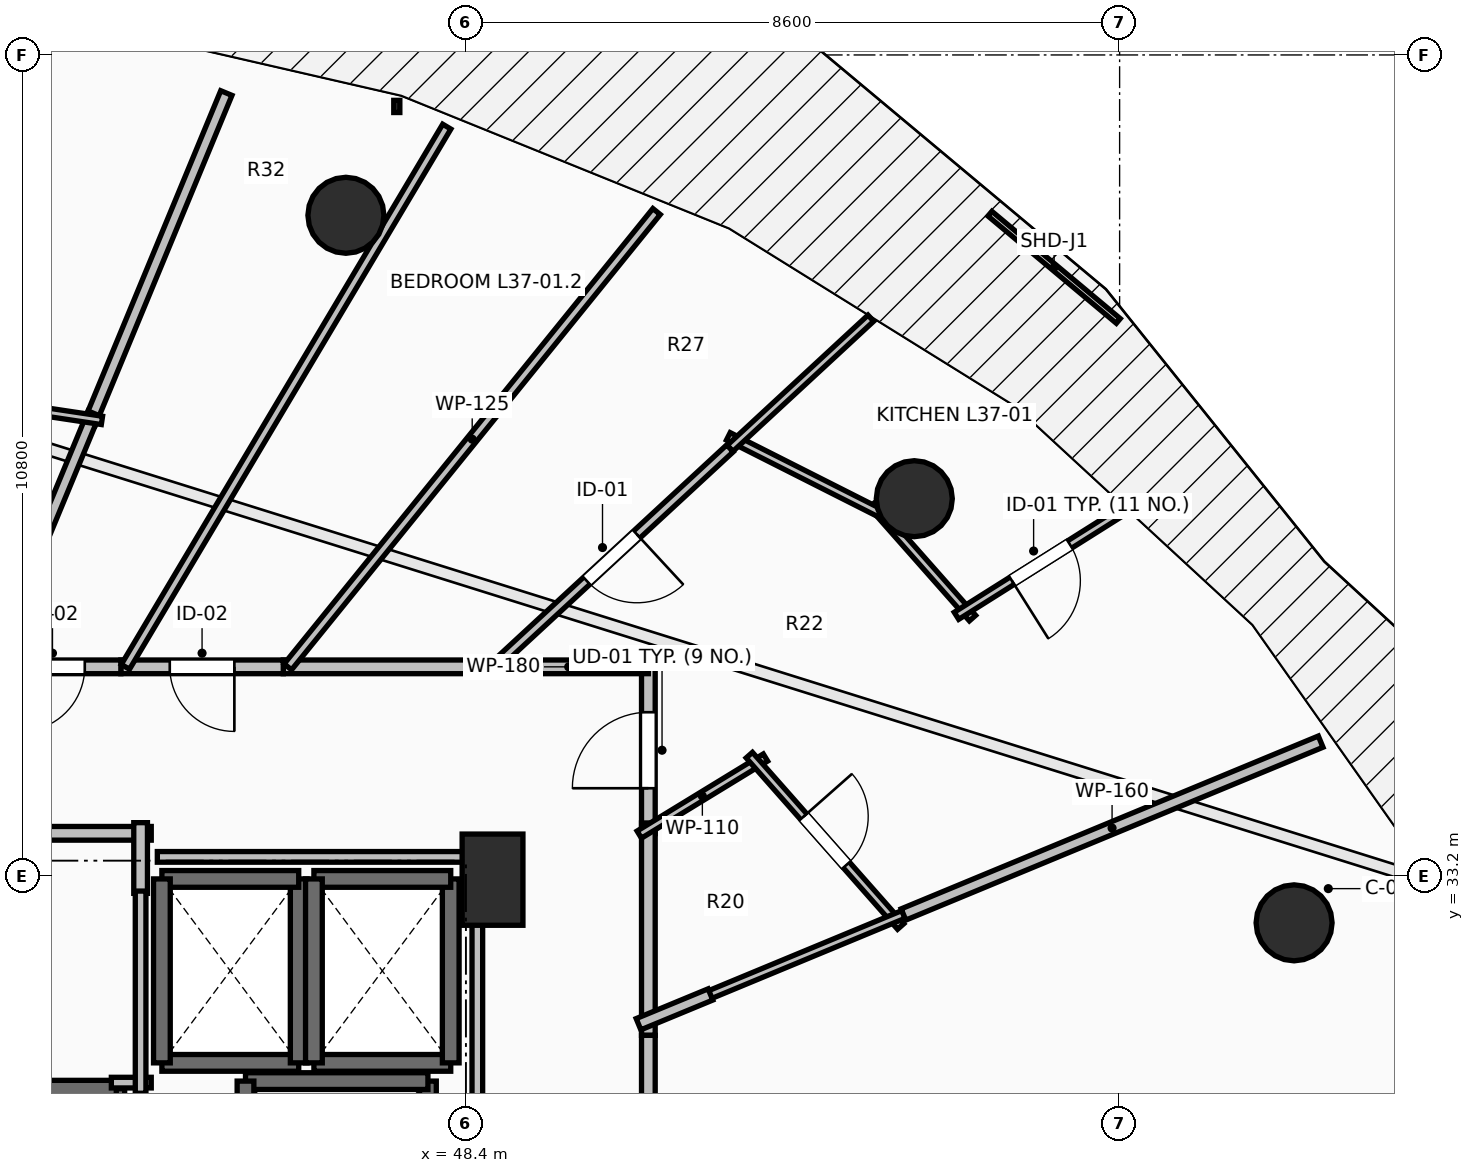
"""IFC4 building model, lengths in metres.
Left out: names, types, materials, properties, quantities, classifications, styles, units other than length and angle.
Written with IfcOpenShell. Run it as: python <this file> out.ifc"""

import sys

from ifc_helpers import new_model, si_unit, direction, frame, frame_2d, origin, origin_2d, place, context, subcontext, project, spatial, rectangle, circle, extrude, element, fill, save


model = new_model("IFC4")
c1 = context("Model", 3, precision=1e-05, world=origin(), true_north=direction((0.0, 1.0)))
c2 = subcontext(c1, "Body", "Model", "MODEL_VIEW")
j1 = project(units=[si_unit("LENGTHUNIT", "METRE"), si_unit("PLANEANGLEUNIT", "RADIAN")], contexts=[c1])
p1 = place(None, origin())
s1 = spatial("IfcSite", under=j1, at=p1, CompositionType="ELEMENT")
p2 = place(p1, origin())
s2 = spatial("IfcBuilding", under=s1, at=p2, CompositionType="ELEMENT")
p3 = place(p2, frame((0.0, 0.0, 139.6)))
s3 = spatial("IfcBuildingStorey", under=s2, at=p3, CompositionType="ELEMENT", Elevation=139.6)
for number, where, z_axis, x_axis in (
    (1, (59.295, 32.582, 0.0), (0.0, 0.0, 1.0), (0.924, 0.383, 0.0)),
    (2, (54.299, 38.162, 0.0), (0.0, 0.0, 1.0), (0.707, 0.707, 0.0)),
    (3, (46.821, 41.891, 0.0), (0.0, 0.0, 1.0), (0.383, 0.924, 0.0)),
):
    element("IfcColumn", number, at=place(p3, frame(where, z_axis=z_axis, x_axis=x_axis)), inside=s3, PredefinedType="COLUMN", context=c2, shape_type="SweptSolid", body=[
        extrude(circle(Radius=0.5, at=origin_2d()), origin(), (0.0, 0.0, 1.0), 3.5),
    ])
p4 = place(p3, frame((48.75, 33.15, 0.0), z_axis=(0.0, 0.0, 1.0), x_axis=(1.0, 0.0, 0.0)))
e4 = element("IfcColumn", 4, at=p4, inside=s3, PredefinedType="PILASTER", context=c2, shape_type="SweptSolid", body=[
    extrude(rectangle(XDim=0.8, YDim=1.2, at=origin_2d()), origin(), (0.0, 0.0, 1.0), 3.5),
])
p5 = place(p3, frame((43.8, 27.8, 0.0), z_axis=(0.0, 0.0, 1.0), x_axis=(0.0, 1.0, 0.0)))
e5 = element("IfcWall", 5, at=p5, inside=s3, PredefinedType="SOLIDWALL", context=c2, shape_type="SweptSolid", body=[
    extrude(rectangle(XDim=2.6, YDim=0.22, at=frame_2d((1.3, 0.0))), origin(), (0.0, 0.0, 1.0), 3.24),
])
p6 = place(p3, frame((43.8, 30.4, 0.0), z_axis=(0.0, 0.0, 1.0), x_axis=(-1.0, 0.0, 0.0)))
e6 = element("IfcWall", 6, at=p6, inside=s3, PredefinedType="SOLIDWALL", context=c2, shape_type="SweptSolid", body=[
    extrude(rectangle(XDim=2.2, YDim=0.22, at=frame_2d((1.1, 0.0))), origin(), (0.0, 0.0, 1.0), 3.24),
])
p7 = place(p3, frame((44.4, 30.74, 0.0), z_axis=(0.0, 0.0, 1.0), x_axis=(1.0, 0.0, 0.0)))
e7 = element("IfcWall", 7, at=p7, inside=s3, PredefinedType="SOLIDWALL", context=c2, shape_type="SweptSolid", body=[
    extrude(rectangle(XDim=1.8, YDim=0.22, at=frame_2d((0.9, 0.0))), origin(), (0.0, 0.0, 1.0), 3.24),
])
p8 = place(p3, frame((46.2, 30.74, 0.0), z_axis=(0.0, 0.0, 1.0), x_axis=(0.0, 1.0, 0.0)))
e8 = element("IfcWall", 8, at=p8, inside=s3, PredefinedType="SOLIDWALL", context=c2, shape_type="SweptSolid", body=[
    extrude(rectangle(XDim=2.42, YDim=0.22, at=frame_2d((1.21, 0.0))), origin(), (0.0, 0.0, 1.0), 3.24),
])
p9 = place(p3, frame((46.2, 33.16, 0.0), z_axis=(0.0, 0.0, 1.0), x_axis=(-1.0, 0.0, 0.0)))
e9 = element("IfcWall", 9, at=p9, inside=s3, PredefinedType="SOLIDWALL", context=c2, shape_type="SweptSolid", body=[
    extrude(rectangle(XDim=1.8, YDim=0.22, at=frame_2d((0.9, 0.0))), origin(), (0.0, 0.0, 1.0), 3.24),
])
p10 = place(p3, frame((44.4, 33.16, 0.0), z_axis=(0.0, 0.0, 1.0), x_axis=(0.0, -1.0, 0.0)))
e10 = element("IfcWall", 10, at=p10, inside=s3, PredefinedType="SOLIDWALL", context=c2, shape_type="SweptSolid", body=[
    extrude(rectangle(XDim=2.42, YDim=0.22, at=frame_2d((1.21, 0.0))), origin(), (0.0, 0.0, 1.0), 3.24),
])
p11 = place(p3, frame((46.4, 30.74, 0.0), z_axis=(0.0, 0.0, 1.0), x_axis=(1.0, 0.0, 0.0)))
e11 = element("IfcWall", 11, at=p11, inside=s3, PredefinedType="SOLIDWALL", context=c2, shape_type="SweptSolid", body=[
    extrude(rectangle(XDim=1.8, YDim=0.22, at=frame_2d((0.9, 0.0))), origin(), (0.0, 0.0, 1.0), 3.24),
])
p12 = place(p3, frame((48.2, 30.74, 0.0), z_axis=(0.0, 0.0, 1.0), x_axis=(0.0, 1.0, 0.0)))
e12 = element("IfcWall", 12, at=p12, inside=s3, PredefinedType="SOLIDWALL", context=c2, shape_type="SweptSolid", body=[
    extrude(rectangle(XDim=2.42, YDim=0.22, at=frame_2d((1.21, 0.0))), origin(), (0.0, 0.0, 1.0), 3.24),
])
p13 = place(p3, frame((48.2, 33.16, 0.0), z_axis=(0.0, 0.0, 1.0), x_axis=(-1.0, 0.0, 0.0)))
e13 = element("IfcWall", 13, at=p13, inside=s3, PredefinedType="SOLIDWALL", context=c2, shape_type="SweptSolid", body=[
    extrude(rectangle(XDim=1.8, YDim=0.22, at=frame_2d((0.9, 0.0))), origin(), (0.0, 0.0, 1.0), 3.24),
])
p14 = place(p3, frame((46.4, 33.16, 0.0), z_axis=(0.0, 0.0, 1.0), x_axis=(0.0, -1.0, 0.0)))
e14 = element("IfcWall", 14, at=p14, inside=s3, PredefinedType="SOLIDWALL", context=c2, shape_type="SweptSolid", body=[
    extrude(rectangle(XDim=2.42, YDim=0.22, at=frame_2d((1.21, 0.0))), origin(), (0.0, 0.0, 1.0), 3.24),
])
p15 = place(p3, frame((47.9, 28.0, 0.0), z_axis=(0.0, 0.0, 1.0), x_axis=(0.0, 1.0, 0.0)))
e15 = element("IfcWall", 15, at=p15, inside=s3, PredefinedType="SHEAR", context=c2, shape_type="SweptSolid", body=[
    extrude(rectangle(XDim=2.5, YDim=0.22, at=frame_2d((1.25, 0.0))), origin(), (0.0, 0.0, 1.0), 3.24),
])
p16 = place(p3, frame((47.9, 30.5, 0.0), z_axis=(0.0, 0.0, 1.0), x_axis=(-1.0, 0.0, 0.0)))
e16 = element("IfcWall", 16, at=p16, inside=s3, PredefinedType="SHEAR", context=c2, shape_type="SweptSolid", body=[
    extrude(rectangle(XDim=2.4, YDim=0.22, at=frame_2d((1.2, 0.0))), origin(), (0.0, 0.0, 1.0), 3.24),
])
p17 = place(p3, frame((45.5, 30.5, 0.0), z_axis=(0.0, 0.0, 1.0), x_axis=(0.0, -1.0, 0.0)))
e17 = element("IfcWall", 17, at=p17, inside=s3, PredefinedType="SHEAR", context=c2, shape_type="SweptSolid", body=[
    extrude(rectangle(XDim=2.5, YDim=0.22, at=frame_2d((1.25, 0.0))), origin(), (0.0, 0.0, 1.0), 3.24),
])
p18 = place(p3, frame((44.26, 33.76, 0.0), z_axis=(0.0, 0.0, 1.0), x_axis=(-1.0, 0.0, 0.0)))
e18 = element("IfcWall", 18, at=p18, inside=s3, PredefinedType="PARTITIONING", context=c2, shape_type="SweptSolid", body=[
    extrude(rectangle(XDim=4.61, YDim=0.18, at=frame_2d((2.305, 0.0))), origin(), (0.0, 0.0, 1.0), 3.24),
])
p19 = place(p18, frame((1.88, 0.0, 0.0)))
e19 = element("IfcOpeningElement", 19, at=p19, cuts=e18, PredefinedType="OPENING", context=c2, shape_type="SweptSolid", body=[
    extrude(rectangle(XDim=0.85, YDim=2.1, at=frame_2d((0.425, 1.05))), frame((0.0, 0.105, 0.0), z_axis=(0.0, -1.0, 0.0), x_axis=(1.0, 0.0, 0.0)), (0.0, 0.0, 1.0), 0.21),
])
p20 = place(p3, frame((44.12, 32.97, 0.0), z_axis=(0.0, 0.0, 1.0), x_axis=(0.0, 1.0, 0.0)))
e20 = element("IfcWall", 20, at=p20, inside=s3, PredefinedType="PARTITIONING", context=c2, shape_type="SweptSolid", body=[
    extrude(rectangle(XDim=0.93, YDim=0.18, at=frame_2d((0.465, 0.0))), origin(), (0.0, 0.0, 1.0), 3.24),
])
p21 = place(p3, frame((50.8, 33.756, 0.0), z_axis=(0.0, 0.0, 1.0), x_axis=(0.0, 1.0, 0.0)))
e21 = element("IfcWall", 21, at=p21, inside=s3, PredefinedType="PARTITIONING", context=c2, shape_type="SweptSolid", body=[
    extrude(rectangle(XDim=2.194, YDim=0.18, at=frame_2d((1.097, 0.0))), origin(), (0.0, 0.0, 1.0), 2.432),
])
p22 = place(p21, frame((0.597, 0.0, 0.0)))
e22 = element("IfcOpeningElement", 22, at=p22, cuts=e21, PredefinedType="OPENING", context=c2, shape_type="SweptSolid", body=[
    extrude(rectangle(XDim=1.0, YDim=2.15, at=frame_2d((0.5, 1.075))), frame((0.0, 0.105, 0.0), z_axis=(0.0, -1.0, 0.0), x_axis=(1.0, 0.0, 0.0)), (0.0, 0.0, 1.0), 0.21),
])
p23 = place(p3, frame((50.8, 35.95, 0.0), z_axis=(0.0, 0.0, 1.0), x_axis=(-1.0, 0.0, 0.0)))
e23 = element("IfcWall", 23, at=p23, inside=s3, PredefinedType="PARTITIONING", context=c2, shape_type="SweptSolid", body=[
    extrude(rectangle(XDim=2.096, YDim=0.18, at=frame_2d((1.048, 0.0))), origin(), (0.0, 0.0, 1.0), 2.972),
])
p24 = place(p3, frame((50.8, 31.102, 0.0), z_axis=(0.0, 0.0, 1.0), x_axis=(0.0, 1.0, 0.0)))
e24 = element("IfcWall", 24, at=p24, inside=s3, PredefinedType="PARTITIONING", context=c2, shape_type="SweptSolid", body=[
    extrude(rectangle(XDim=2.794, YDim=0.18, at=frame_2d((1.397, 0.0))), origin(), (0.0, 0.0, 1.0), 2.432),
])
p25 = place(p3, frame((48.704, 35.95, 0.0), z_axis=(0.0, 0.0, 1.0), x_axis=(-1.0, 0.0, 0.0)))
e25 = element("IfcWall", 25, at=p25, inside=s3, PredefinedType="PARTITIONING", context=c2, shape_type="SweptSolid", body=[
    extrude(rectangle(XDim=2.707, YDim=0.18, at=frame_2d((1.354, 0.0))), origin(), (0.0, 0.0, 1.0), 2.432),
])
p26 = place(p3, frame((45.997, 35.95, 0.0), z_axis=(0.0, 0.0, 1.0), x_axis=(-1.0, 0.0, 0.0)))
e26 = element("IfcWall", 26, at=p26, inside=s3, PredefinedType="PARTITIONING", context=c2, shape_type="SweptSolid", body=[
    extrude(rectangle(XDim=2.137, YDim=0.18, at=frame_2d((1.068, 0.0))), origin(), (0.0, 0.0, 1.0), 2.972),
])
p27 = place(p26, frame((0.644, 0.0, 0.0)))
e27 = element("IfcOpeningElement", 27, at=p27, cuts=e26, PredefinedType="OPENING", context=c2, shape_type="SweptSolid", body=[
    extrude(rectangle(XDim=0.85, YDim=2.1, at=frame_2d((0.425, 1.05))), frame((0.0, 0.105, 0.0), z_axis=(0.0, -1.0, 0.0), x_axis=(1.0, 0.0, 0.0)), (0.0, 0.0, 1.0), 0.21),
])
p28 = place(p3, frame((43.86, 35.95, 0.0), z_axis=(0.0, 0.0, 1.0), x_axis=(-1.0, 0.0, 0.0)))
e28 = element("IfcWall", 28, at=p28, inside=s3, PredefinedType="PARTITIONING", context=c2, shape_type="SweptSolid", body=[
    extrude(rectangle(XDim=1.799, YDim=0.18, at=frame_2d((0.899, 0.0))), origin(), (0.0, 0.0, 1.0), 3.24),
])
p29 = place(p28, frame((0.475, 0.0, 0.0)))
e29 = element("IfcOpeningElement", 29, at=p29, cuts=e28, PredefinedType="OPENING", context=c2, shape_type="SweptSolid", body=[
    extrude(rectangle(XDim=0.85, YDim=2.1, at=frame_2d((0.425, 1.05))), frame((0.0, 0.105, 0.0), z_axis=(0.0, -1.0, 0.0), x_axis=(1.0, 0.0, 0.0)), (0.0, 0.0, 1.0), 0.21),
])
p30 = place(p3, frame((50.8, 27.25, 0.0), z_axis=(0.0, 0.0, 1.0), x_axis=(0.0, 1.0, 0.0)))
e30 = element("IfcWall", 30, at=p30, inside=s3, PredefinedType="PARTITIONING", context=c2, shape_type="SweptSolid", body=[
    extrude(rectangle(XDim=3.852, YDim=0.18, at=frame_2d((1.926, 0.0))), origin(), (0.0, 0.0, 1.0), 2.432),
])
p31 = place(p3, frame((50.68, 33.743, 0.0), z_axis=(0.0, 0.0, 1.0), x_axis=(0.853368681548, 0.52130786811, 0.0)))
e31 = element("IfcWall", 31, at=p31, inside=s3, PredefinedType="PARTITIONING", context=c2, shape_type="SweptSolid", body=[
    extrude(rectangle(XDim=1.945, YDim=0.11, at=frame_2d((0.973, 0.0))), origin(), (0.0, 0.0, 1.0), 2.972),
])
p32 = place(p3, frame((52.128, 34.789, 0.0), z_axis=(0.0, 0.0, 1.0), x_axis=(0.66196248337, -0.74953697081, 0.0)))
e32 = element("IfcWall", 32, at=p32, inside=s3, PredefinedType="PARTITIONING", context=c2, shape_type="SweptSolid", body=[
    extrude(rectangle(XDim=3.008, YDim=0.11, at=frame_2d((1.504, 0.0))), origin(), (0.0, 0.0, 1.0), 2.432),
])
p33 = place(p32, frame((1.079, 0.0, 0.0)))
e33 = element("IfcOpeningElement", 33, at=p33, cuts=e32, PredefinedType="OPENING", context=c2, shape_type="SweptSolid", body=[
    extrude(rectangle(XDim=0.85, YDim=2.1, at=frame_2d((0.425, 1.05))), frame((0.0, 0.07, 0.0), z_axis=(0.0, -1.0, 0.0), x_axis=(1.0, 0.0, 0.0)), (0.0, 0.0, 1.0), 0.14),
])
p34 = place(p3, frame((54.156, 32.693, 0.0), z_axis=(0.0, 0.0, 1.0), x_axis=(-0.923770555063, -0.382946421316, 0.0)))
e34 = element("IfcWall", 34, at=p34, inside=s3, PredefinedType="PARTITIONING", context=c2, shape_type="SweptSolid", body=[
    extrude(rectangle(XDim=2.889, YDim=0.11, at=frame_2d((1.444, 0.0))), origin(), (0.0, 0.0, 1.0), 2.432),
])
p35 = place(p3, frame((55.065, 36.591, 0.0), z_axis=(0.0, 0.0, 1.0), x_axis=(-0.66216897397, 0.749354555542, 0.0)))
e35 = element("IfcWall", 35, at=p35, inside=s3, PredefinedType="PARTITIONING", context=c2, shape_type="SweptSolid", body=[
    extrude(rectangle(XDim=1.991, YDim=0.11, at=frame_2d((0.996, 0.0))), origin(), (0.0, 0.0, 1.0), 2.432),
])
p36 = place(p3, frame((53.964, 37.915, 0.0), z_axis=(0.0, 0.0, 1.0), x_axis=(-0.89250004606, 0.451047301049, 0.0)))
e36 = element("IfcWall", 36, at=p36, inside=s3, PredefinedType="PARTITIONING", context=c2, shape_type="SweptSolid", body=[
    extrude(rectangle(XDim=2.366, YDim=0.11, at=frame_2d((1.183, 0.0))), origin(), (0.0, 0.0, 1.0), 2.432),
])
p37 = place(p3, frame((51.874, 38.824, 0.0), z_axis=(0.0, 0.0, 1.0), x_axis=(0.734191073284, 0.678942904749, 0.0)))
e37 = element("IfcWall", 37, at=p37, inside=s3, PredefinedType="PARTITIONING", context=c2, shape_type="SweptSolid", body=[
    extrude(rectangle(XDim=2.523, YDim=0.11, at=frame_2d((1.262, 0.0))), origin(), (0.0, 0.0, 1.0), 2.728),
])
p38 = place(p3, frame((57.075, 38.021, 0.0), z_axis=(0.0, 0.0, 1.0), x_axis=(-0.846034075758, -0.533128823697, 0.0)))
e38 = element("IfcWall", 38, at=p38, inside=s3, PredefinedType="PARTITIONING", context=c2, shape_type="SweptSolid", body=[
    extrude(rectangle(XDim=2.626, YDim=0.11, at=frame_2d((1.313, 0.0))), origin(), (0.0, 0.0, 1.0), 2.728),
])
p39 = place(p38, frame((0.863, 0.0, 0.0)))
e39 = element("IfcOpeningElement", 39, at=p39, cuts=e38, PredefinedType="OPENING", context=c2, shape_type="SweptSolid", body=[
    extrude(rectangle(XDim=0.9, YDim=2.1, at=frame_2d((0.45, 1.05))), frame((0.0, 0.07, 0.0), z_axis=(0.0, -1.0, 0.0), x_axis=(1.0, 0.0, 0.0)), (0.0, 0.0, 1.0), 0.14),
])
p40 = place(p3, frame((51.874, 38.824, 0.0), z_axis=(0.0, 0.0, 1.0), x_axis=(-0.734347971597, -0.678773199685, 0.0)))
e40 = element("IfcWall", 40, at=p40, inside=s3, PredefinedType="PARTITIONING", context=c2, shape_type="SweptSolid", body=[
    extrude(rectangle(XDim=4.235, YDim=0.125, at=frame_2d((2.117, 0.0))), origin(), (0.0, 0.0, 1.0), 2.922),
])
p41 = place(p40, frame((1.667, 0.0, 0.0)))
e41 = element("IfcOpeningElement", 41, at=p41, cuts=e40, PredefinedType="OPENING", context=c2, shape_type="SweptSolid", body=[
    extrude(rectangle(XDim=0.9, YDim=2.1, at=frame_2d((0.45, 1.05))), frame((0.0, 0.077, 0.0), z_axis=(0.0, -1.0, 0.0), x_axis=(1.0, 0.0, 0.0)), (0.0, 0.0, 1.0), 0.155),
])
p42 = place(p3, frame((54.156, 32.692, 0.0), z_axis=(0.0, 0.0, 1.0), x_axis=(0.923849528339, 0.382755860814, 0.0)))
e42 = element("IfcWall", 42, at=p42, inside=s3, PredefinedType="PARTITIONING", context=c2, shape_type="SweptSolid", body=[
    extrude(rectangle(XDim=5.941, YDim=0.16, at=frame_2d((2.97, 0.0))), origin(), (0.0, 0.0, 1.0), 2.432),
])
p43 = place(p3, frame((50.671, 31.249, 0.0), z_axis=(0.0, 0.0, 1.0), x_axis=(0.924089428906, 0.38217630406, 0.0)))
e43 = element("IfcWall", 43, at=p43, inside=s3, PredefinedType="PARTITIONING", context=c2, shape_type="SweptSolid", body=[
    extrude(rectangle(XDim=1.024, YDim=0.16, at=frame_2d((0.512, 0.0))), origin(), (0.0, 0.0, 1.0), 3.24),
])
p44 = place(p3, frame((50.908, 41.94, 0.0), z_axis=(0.0, 0.0, 1.0), x_axis=(-0.62935766896, -0.77711577292, 0.0)))
e44 = element("IfcWall", 44, at=p44, inside=s3, PredefinedType="PARTITIONING", context=c2, shape_type="SweptSolid", body=[
    extrude(rectangle(XDim=7.708, YDim=0.125, at=frame_2d((3.854, 0.0))), origin(), (0.0, 0.0, 1.0), 2.432),
])
p45 = place(p3, frame((48.148, 43.057, 0.0), z_axis=(0.0, 0.0, 1.0), x_axis=(-0.511279346901, -0.859414585304, 0.0)))
e45 = element("IfcWall", 45, at=p45, inside=s3, PredefinedType="PARTITIONING", context=c2, shape_type="SweptSolid", body=[
    extrude(rectangle(XDim=8.27, YDim=0.125, at=frame_2d((4.135, 0.0))), origin(), (0.0, 0.0, 1.0), 2.432),
])
p46 = place(p3, frame((45.248, 43.499, 0.0), z_axis=(0.0, 0.0, 1.0), x_axis=(-0.382708032219, -0.923869342535, 0.0)))
e46 = element("IfcWall", 46, at=p46, inside=s3, PredefinedType="PARTITIONING", context=c2, shape_type="SweptSolid", body=[
    extrude(rectangle(XDim=4.701, YDim=0.16, at=frame_2d((2.351, 0.0))), origin(), (0.0, 0.0, 1.0), 2.728),
])
p47 = place(p3, frame((43.503, 39.285, 0.0), z_axis=(0.0, 0.0, 1.0), x_axis=(-0.382733183699, -0.923858923265, 0.0)))
e47 = element("IfcWall", 47, at=p47, inside=s3, PredefinedType="PARTITIONING", context=c2, shape_type="SweptSolid", body=[
    extrude(rectangle(XDim=3.75, YDim=0.16, at=frame_2d((1.875, 0.0))), origin(), (0.0, 0.0, 1.0), 2.922),
])
p48 = place(p3, frame((41.43, 39.52, 0.0), z_axis=(0.0, 0.0, 1.0), x_axis=(0.98891036234, -0.148513619769, 0.0)))
e48 = element("IfcWall", 48, at=p48, inside=s3, PredefinedType="PARTITIONING", context=c2, shape_type="SweptSolid", body=[
    extrude(rectangle(XDim=2.206, YDim=0.11, at=frame_2d((1.103, 0.0))), origin(), (0.0, 0.0, 1.0), 2.922),
])
p49 = place(p3, frame((43.735, 30.48, 0.0), z_axis=(0.0, 0.0, 1.0), x_axis=(1.0, 0.0, 0.0)))
e49 = element("IfcWall", 49, at=p49, inside=s3, PredefinedType="PARTITIONING", context=c2, shape_type="SweptSolid", body=[
    extrude(rectangle(XDim=0.525, YDim=0.14, at=frame_2d((0.262, 0.0))), origin(), (0.0, 0.0, 1.0), 3.24),
])
p50 = place(p3, frame((44.12, 30.34, 0.0), z_axis=(0.0, 0.0, 1.0), x_axis=(0.0, 1.0, 0.0)))
e50 = element("IfcWall", 50, at=p50, inside=s3, PredefinedType="PARTITIONING", context=c2, shape_type="SweptSolid", body=[
    extrude(rectangle(XDim=2.66, YDim=0.14, at=frame_2d((1.33, 0.0))), origin(), (0.0, 0.0, 1.0), 3.24),
])
p51 = place(p3, frame((48.55, 28.196, 0.0), z_axis=(0.0, 0.0, 1.0), x_axis=(0.0, 1.0, 0.0)))
e51 = element("IfcWall", 51, at=p51, inside=s3, PredefinedType="PARTITIONING", context=c2, shape_type="SweptSolid", body=[
    extrude(rectangle(XDim=5.254, YDim=0.14, at=frame_2d((2.627, 0.0))), origin(), (0.0, 0.0, 1.0), 2.432),
])
p52 = place(p3, frame((48.55, 33.45, 0.0), z_axis=(0.0, 0.0, 1.0), x_axis=(-1.0, 0.0, 0.0)))
e52 = element("IfcWall", 52, at=p52, inside=s3, PredefinedType="PARTITIONING", context=c2, shape_type="SweptSolid", body=[
    extrude(rectangle(XDim=4.21, YDim=0.14, at=frame_2d((2.105, 0.0))), origin(), (0.0, 0.0, 1.0), 2.432),
])
p53 = place(p22, origin())
e53 = element("IfcDoor", 53, at=p53, inside=s3, OperationType="SINGLE_SWING_LEFT", PredefinedType="DOOR", context=c2, shape_type="SweptSolid", body=[
    extrude(rectangle(XDim=1.0, YDim=2.15, at=frame_2d((0.5, 1.075))), frame((0.0, 0.025, 0.0), z_axis=(0.0, -1.0, 0.0), x_axis=(1.0, 0.0, 0.0)), (0.0, 0.0, 1.0), 0.05),
])
fill(e22, e53)
p54 = place(p33, origin())
e54 = element("IfcDoor", 54, at=p54, inside=s3, OperationType="SINGLE_SWING_LEFT", PredefinedType="DOOR", context=c2, shape_type="SweptSolid", body=[
    extrude(rectangle(XDim=0.85, YDim=2.1, at=frame_2d((0.425, 1.05))), frame((0.0, 0.025, 0.0), z_axis=(0.0, -1.0, 0.0), x_axis=(1.0, 0.0, 0.0)), (0.0, 0.0, 1.0), 0.05),
])
fill(e33, e54)
p55 = place(p39, origin())
e55 = element("IfcDoor", 55, at=p55, inside=s3, OperationType="SINGLE_SWING_RIGHT", PredefinedType="DOOR", context=c2, shape_type="SweptSolid", body=[
    extrude(rectangle(XDim=0.9, YDim=2.1, at=frame_2d((0.45, 1.05))), frame((0.0, 0.025, 0.0), z_axis=(0.0, -1.0, 0.0), x_axis=(1.0, 0.0, 0.0)), (0.0, 0.0, 1.0), 0.05),
])
fill(e39, e55)
p56 = place(p41, origin())
e56 = element("IfcDoor", 56, at=p56, inside=s3, OperationType="SINGLE_SWING_LEFT", PredefinedType="DOOR", context=c2, shape_type="SweptSolid", body=[
    extrude(rectangle(XDim=0.9, YDim=2.1, at=frame_2d((0.45, 1.05))), frame((0.0, 0.025, 0.0), z_axis=(0.0, -1.0, 0.0), x_axis=(1.0, 0.0, 0.0)), (0.0, 0.0, 1.0), 0.05),
])
fill(e41, e56)
p57 = place(p27, origin())
e57 = element("IfcDoor", 57, at=p57, inside=s3, OperationType="SINGLE_SWING_LEFT", PredefinedType="DOOR", context=c2, shape_type="SweptSolid", body=[
    extrude(rectangle(XDim=0.85, YDim=2.1, at=frame_2d((0.425, 1.05))), frame((0.0, 0.025, 0.0), z_axis=(0.0, -1.0, 0.0), x_axis=(1.0, 0.0, 0.0)), (0.0, 0.0, 1.0), 0.05),
])
fill(e27, e57)
p58 = place(p29, origin())
e58 = element("IfcDoor", 58, at=p58, inside=s3, OperationType="SINGLE_SWING_RIGHT", PredefinedType="DOOR", context=c2, shape_type="SweptSolid", body=[
    extrude(rectangle(XDim=0.85, YDim=2.1, at=frame_2d((0.425, 1.05))), frame((0.0, 0.025, 0.0), z_axis=(0.0, -1.0, 0.0), x_axis=(1.0, 0.0, 0.0)), (0.0, 0.0, 1.0), 0.05),
])
fill(e29, e58)
save(model, sys.argv[1])
